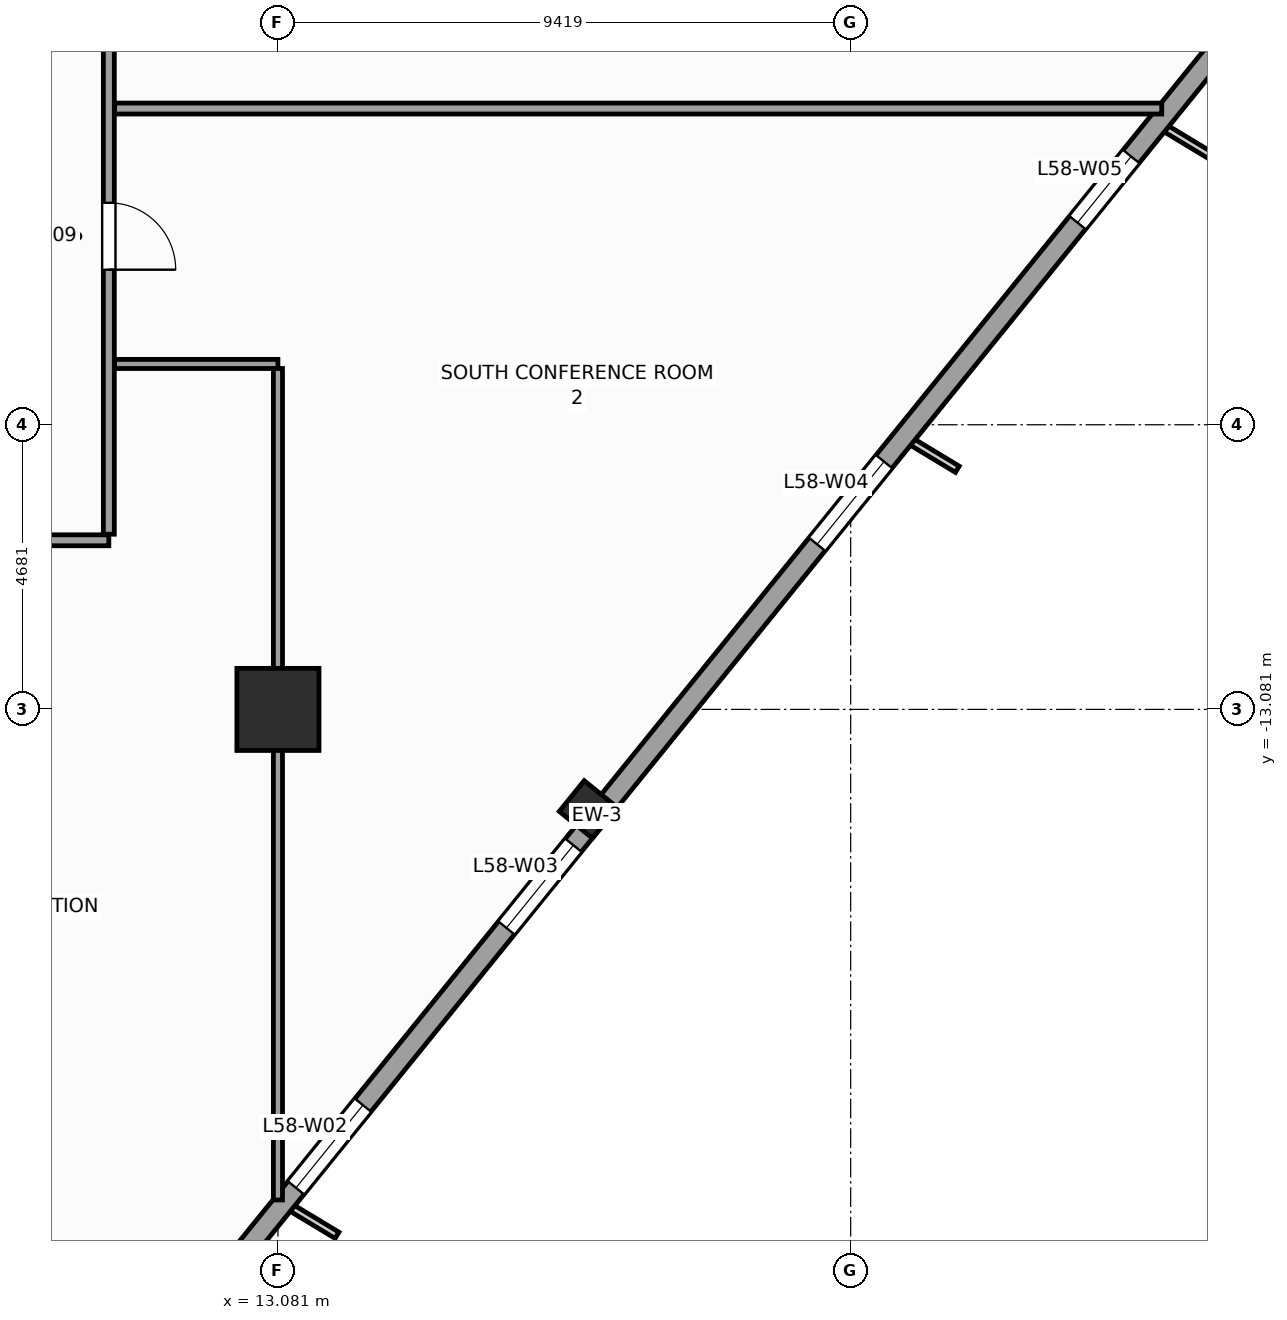
"""IFC4 building model, lengths in metres.
Left out: names, types, materials, properties, quantities, classifications, styles, units other than length and angle.
Written with IfcOpenShell. Run it as: python <this file> out.ifc"""

import sys

from ifc_helpers import new_model, si_unit, direction, frame, frame_2d, origin, origin_2d, place, context, subcontext, project, spatial, rectangle, extrude, source, transform, mapped, element, fill, save


model = new_model("IFC4")
c1 = context("Model", 3, precision=1e-05, world=origin(), true_north=direction((0.0, 1.0)))
c2 = subcontext(c1, "Body", "Model", "MODEL_VIEW")
j1 = project(units=[si_unit("LENGTHUNIT", "METRE"), si_unit("PLANEANGLEUNIT", "RADIAN")], contexts=[c1])
p1 = place(None, origin())
s1 = spatial("IfcSite", under=j1, at=p1, CompositionType="ELEMENT")
p2 = place(p1, origin())
s2 = spatial("IfcBuilding", under=s1, at=p2, CompositionType="ELEMENT")
p3 = place(p2, frame((0.0, 0.0, 240.7)))
s3 = spatial("IfcBuildingStorey", under=s2, at=p3, CompositionType="ELEMENT", Elevation=240.7)
m1 = source(origin(), c2, "Body", "SweptSolid", [
    extrude(rectangle(XDim=1.35, YDim=1.35, at=origin_2d()), origin(), (0.0, 0.0, 1.0), 3.9),
])
p4 = place(p3, frame((13.081, -13.081, 0.0), z_axis=(0.0, 0.0, 1.0), x_axis=(1.0, 0.0, 0.0)))
e1 = element("IfcColumn", 1, at=p4, inside=s3, PredefinedType="COLUMN", context=c2, shape_type="MappedRepresentation", body=[
    mapped(m1, transform((0.0, 0.0, 0.0), scale=1.0)),
])
m2 = source(origin(), c2, "Body", "SweptSolid", [
    extrude(rectangle(XDim=0.65, YDim=0.7, at=origin_2d()), origin(), (0.0, 0.0, 1.0), 3.9),
])
p5 = place(p3, frame((18.185, -14.726, 0.0), z_axis=(0.0, 0.0, 1.0), x_axis=(0.62932039105, 0.777145961457, 0.0)))
e2 = element("IfcColumn", 2, at=p5, inside=s3, PredefinedType="COLUMN", context=c2, shape_type="MappedRepresentation", body=[
    mapped(m2, transform((0.0, 0.0, 0.0), scale=1.0)),
])
p6 = place(p3, frame((6.733, -29.154, 0.0), z_axis=(0.0, 0.0, 1.0), x_axis=(0.629325378072, 0.77714192302, 0.0)))
e3 = element("IfcWall", 3, at=p6, inside=s3, PredefinedType="STANDARD", context=c2, shape_type="SweptSolid", body=[
    extrude(rectangle(XDim=36.84, YDim=0.34, at=frame_2d((18.42, 0.0))), origin(), (0.0, 0.0, 1.0), 2.96),
])
p7 = place(p6, frame((3.721, 0.0, 0.48)))
e4 = element("IfcOpeningElement", 4, at=p7, cuts=e3, PredefinedType="OPENING", context=c2, shape_type="SweptSolid", body=[
    extrude(rectangle(XDim=1.4, YDim=2.4, at=frame_2d((0.7, 1.2))), frame((0.0, 0.18, 0.0), z_axis=(0.0, -1.0, 0.0), x_axis=(1.0, 0.0, 0.0)), (0.0, 0.0, 1.0), 0.36),
])
p8 = place(p6, frame((10.559, 0.0, 0.58)))
e5 = element("IfcOpeningElement", 5, at=p8, cuts=e3, PredefinedType="OPENING", context=c2, shape_type="SweptSolid", body=[
    extrude(rectangle(XDim=1.75, YDim=2.3, at=frame_2d((0.875, 1.15))), frame((0.0, 0.18, 0.0), z_axis=(0.0, -1.0, 0.0), x_axis=(1.0, 0.0, 0.0)), (0.0, 0.0, 1.0), 0.36),
])
p9 = place(p6, frame((16.058, 0.0, 0.58)))
e6 = element("IfcOpeningElement", 6, at=p9, cuts=e3, PredefinedType="OPENING", context=c2, shape_type="SweptSolid", body=[
    extrude(rectangle(XDim=1.75, YDim=2.3, at=frame_2d((0.875, 1.15))), frame((0.0, 0.18, 0.0), z_axis=(0.0, -1.0, 0.0), x_axis=(1.0, 0.0, 0.0)), (0.0, 0.0, 1.0), 0.36),
])
p10 = place(p6, frame((24.176, 0.0, 0.58)))
e7 = element("IfcOpeningElement", 7, at=p10, cuts=e3, PredefinedType="OPENING", context=c2, shape_type="SweptSolid", body=[
    extrude(rectangle(XDim=1.75, YDim=2.3, at=frame_2d((0.875, 1.15))), frame((0.0, 0.18, 0.0), z_axis=(0.0, -1.0, 0.0), x_axis=(1.0, 0.0, 0.0)), (0.0, 0.0, 1.0), 0.36),
])
p11 = place(p6, frame((30.982, 0.0, 0.48)))
e8 = element("IfcOpeningElement", 8, at=p11, cuts=e3, PredefinedType="OPENING", context=c2, shape_type="SweptSolid", body=[
    extrude(rectangle(XDim=1.4, YDim=2.4, at=frame_2d((0.7, 1.2))), frame((0.0, 0.18, 0.0), z_axis=(0.0, -1.0, 0.0), x_axis=(1.0, 0.0, 0.0)), (0.0, 0.0, 1.0), 0.36),
])
p12 = place(p3, frame((-11.4, -10.3, 0.0), z_axis=(0.0, 0.0, 1.0), x_axis=(1.0, 0.0, 0.0)))
e9 = element("IfcWall", 9, at=p12, inside=s3, PredefinedType="PARTITIONING", context=c2, shape_type="SweptSolid", body=[
    extrude(rectangle(XDim=21.7, YDim=0.18, at=frame_2d((10.85, 0.0))), origin(), (0.0, 0.0, 1.0), 3.66),
])
p13 = place(p12, frame((12.989, 0.0, 0.0)))
e10 = element("IfcOpeningElement", 10, at=p13, cuts=e9, PredefinedType="OPENING", context=c2, shape_type="SweptSolid", body=[
    extrude(rectangle(XDim=0.95, YDim=2.1, at=frame_2d((0.475, 1.05))), frame((0.0, 0.1, 0.0), z_axis=(0.0, -1.0, 0.0), x_axis=(1.0, 0.0, 0.0)), (0.0, 0.0, 1.0), 0.2),
])
p14 = place(p12, frame((17.585, 0.0, 0.0)))
e11 = element("IfcOpeningElement", 11, at=p14, cuts=e9, PredefinedType="OPENING", context=c2, shape_type="SweptSolid", body=[
    extrude(rectangle(XDim=1.1, YDim=2.2, at=frame_2d((0.55, 1.1))), frame((0.0, 0.1, 0.0), z_axis=(0.0, -1.0, 0.0), x_axis=(1.0, 0.0, 0.0)), (0.0, 0.0, 1.0), 0.2),
])
p15 = place(p12, frame((9.075, 0.0, 0.0)))
e12 = element("IfcOpeningElement", 12, at=p15, cuts=e9, PredefinedType="OPENING", context=c2, shape_type="SweptSolid", body=[
    extrude(rectangle(XDim=1.1, YDim=2.2, at=frame_2d((0.55, 1.1))), frame((0.0, 0.1, 0.0), z_axis=(0.0, -1.0, 0.0), x_axis=(1.0, 0.0, 0.0)), (0.0, 0.0, 1.0), 0.2),
])
p16 = place(p12, frame((3.724, 0.0, 0.0)))
e13 = element("IfcOpeningElement", 13, at=p16, cuts=e9, PredefinedType="OPENING", context=c2, shape_type="SweptSolid", body=[
    extrude(rectangle(XDim=1.1, YDim=2.2, at=frame_2d((0.55, 1.1))), frame((0.0, 0.1, 0.0), z_axis=(0.0, -1.0, 0.0), x_axis=(1.0, 0.0, 0.0)), (0.0, 0.0, 1.0), 0.2),
])
p17 = place(p3, frame((10.3, -10.2, 0.0), z_axis=(0.0, 0.0, 1.0), x_axis=(0.0, 1.0, 0.0)))
e14 = element("IfcWall", 14, at=p17, inside=s3, PredefinedType="PARTITIONING", context=c2, shape_type="SweptSolid", body=[
    extrude(rectangle(XDim=20.4, YDim=0.18, at=frame_2d((10.2, 0.0))), origin(), (0.0, 0.0, 1.0), 3.66),
])
p18 = place(p17, frame((14.95, 0.0, 0.0)))
e15 = element("IfcOpeningElement", 15, at=p18, cuts=e14, PredefinedType="OPENING", context=c2, shape_type="SweptSolid", body=[
    extrude(rectangle(XDim=1.1, YDim=2.2, at=frame_2d((0.55, 1.1))), frame((0.0, 0.1, 0.0), z_axis=(0.0, -1.0, 0.0), x_axis=(1.0, 0.0, 0.0)), (0.0, 0.0, 1.0), 0.2),
])
p19 = place(p17, frame((9.65, 0.0, 0.0)))
e16 = element("IfcOpeningElement", 16, at=p19, cuts=e14, PredefinedType="OPENING", context=c2, shape_type="SweptSolid", body=[
    extrude(rectangle(XDim=1.1, YDim=2.2, at=frame_2d((0.55, 1.1))), frame((0.0, 0.1, 0.0), z_axis=(0.0, -1.0, 0.0), x_axis=(1.0, 0.0, 0.0)), (0.0, 0.0, 1.0), 0.2),
])
p20 = place(p17, frame((4.35, 0.0, 0.0)))
e17 = element("IfcOpeningElement", 17, at=p20, cuts=e14, PredefinedType="OPENING", context=c2, shape_type="SweptSolid", body=[
    extrude(rectangle(XDim=1.1, YDim=2.2, at=frame_2d((0.55, 1.1))), frame((0.0, 0.1, 0.0), z_axis=(0.0, -1.0, 0.0), x_axis=(1.0, 0.0, 0.0)), (0.0, 0.0, 1.0), 0.2),
])
p21 = place(p3, frame((10.395, -3.2, 0.0), z_axis=(0.0, 0.0, 1.0), x_axis=(1.0, 0.0, 0.0)))
e18 = element("IfcWall", 18, at=p21, inside=s3, PredefinedType="PARTITIONING", context=c2, shape_type="SweptSolid", body=[
    extrude(rectangle(XDim=17.22, YDim=0.18, at=frame_2d((8.61, 0.0))), origin(), (0.0, 0.0, 1.0), 3.66),
])
p22 = place(p3, frame((10.395, -7.4, 0.0), z_axis=(0.0, 0.0, 1.0), x_axis=(1.0, 0.0, 0.0)))
e19 = element("IfcWall", 19, at=p22, inside=s3, PredefinedType="PARTITIONING", context=c2, shape_type="SweptSolid", body=[
    extrude(rectangle(XDim=2.686, YDim=0.15, at=frame_2d((1.343, 0.0))), origin(), (0.0, 0.0, 1.0), 3.66),
])
p23 = place(p3, frame((13.081, -7.475, 0.0), z_axis=(0.0, 0.0, 1.0), x_axis=(0.0, -1.0, 0.0)))
e20 = element("IfcWall", 20, at=p23, inside=s3, PredefinedType="PARTITIONING", context=c2, shape_type="SweptSolid", body=[
    extrude(rectangle(XDim=13.673, YDim=0.15, at=frame_2d((6.837, 0.0))), origin(), (0.0, 0.0, 1.0), 2.76),
])
m3 = source(origin(), c2, "Body", "SweptSolid", [
    extrude(rectangle(XDim=1.75, YDim=2.3, at=frame_2d((0.875, 1.15))), frame((0.0, 0.03, 0.0), z_axis=(0.0, -1.0, 0.0), x_axis=(1.0, 0.0, 0.0)), (0.0, 0.0, 1.0), 0.06),
])
p24 = place(p8, origin())
e21 = element("IfcWindow", 21, at=p24, inside=s3, PartitioningType="SINGLE_PANEL", PredefinedType="WINDOW", context=c2, shape_type="MappedRepresentation", body=[
    mapped(m3, transform((0.0, 0.0, 0.0), scale=1.0)),
])
fill(e5, e21)
p25 = place(p9, origin())
e22 = element("IfcWindow", 22, at=p25, inside=s3, PartitioningType="SINGLE_PANEL", PredefinedType="WINDOW", context=c2, shape_type="MappedRepresentation", body=[
    mapped(m3, transform((0.0, 0.0, 0.0), scale=1.0)),
])
fill(e6, e22)
p26 = place(p10, origin())
e23 = element("IfcWindow", 23, at=p26, inside=s3, PartitioningType="SINGLE_PANEL", PredefinedType="WINDOW", context=c2, shape_type="MappedRepresentation", body=[
    mapped(m3, transform((0.0, 0.0, 0.0), scale=1.0)),
])
fill(e7, e23)
m4 = source(origin(), c2, "Body", "SweptSolid", [
    extrude(rectangle(XDim=1.4, YDim=2.4, at=frame_2d((0.7, 1.2))), frame((0.0, 0.03, 0.0), z_axis=(0.0, -1.0, 0.0), x_axis=(1.0, 0.0, 0.0)), (0.0, 0.0, 1.0), 0.06),
])
p27 = place(p11, origin())
e24 = element("IfcWindow", 24, at=p27, inside=s3, PartitioningType="SINGLE_PANEL", PredefinedType="WINDOW", context=c2, shape_type="MappedRepresentation", body=[
    mapped(m4, transform((0.0, 0.0, 0.0), scale=1.0)),
])
fill(e8, e24)
m5 = source(origin(), c2, "Body", "SweptSolid", [
    extrude(rectangle(XDim=1.1, YDim=2.2, at=frame_2d((0.55, 1.1))), frame((0.0, 0.025, 0.0), z_axis=(0.0, -1.0, 0.0), x_axis=(1.0, 0.0, 0.0)), (0.0, 0.0, 1.0), 0.05),
])
p28 = place(p20, frame((1.1, 0.0, 0.0), z_axis=(0.0, 0.0, 1.0), x_axis=(-1.0, 0.0, 0.0)))
e25 = element("IfcDoor", 25, at=p28, inside=s3, OperationType="SINGLE_SWING_LEFT", PredefinedType="DOOR", context=c2, shape_type="MappedRepresentation", body=[
    mapped(m5, transform((0.0, 0.0, 0.0), scale=1.0)),
])
fill(e17, e25)
save(model, sys.argv[1])
